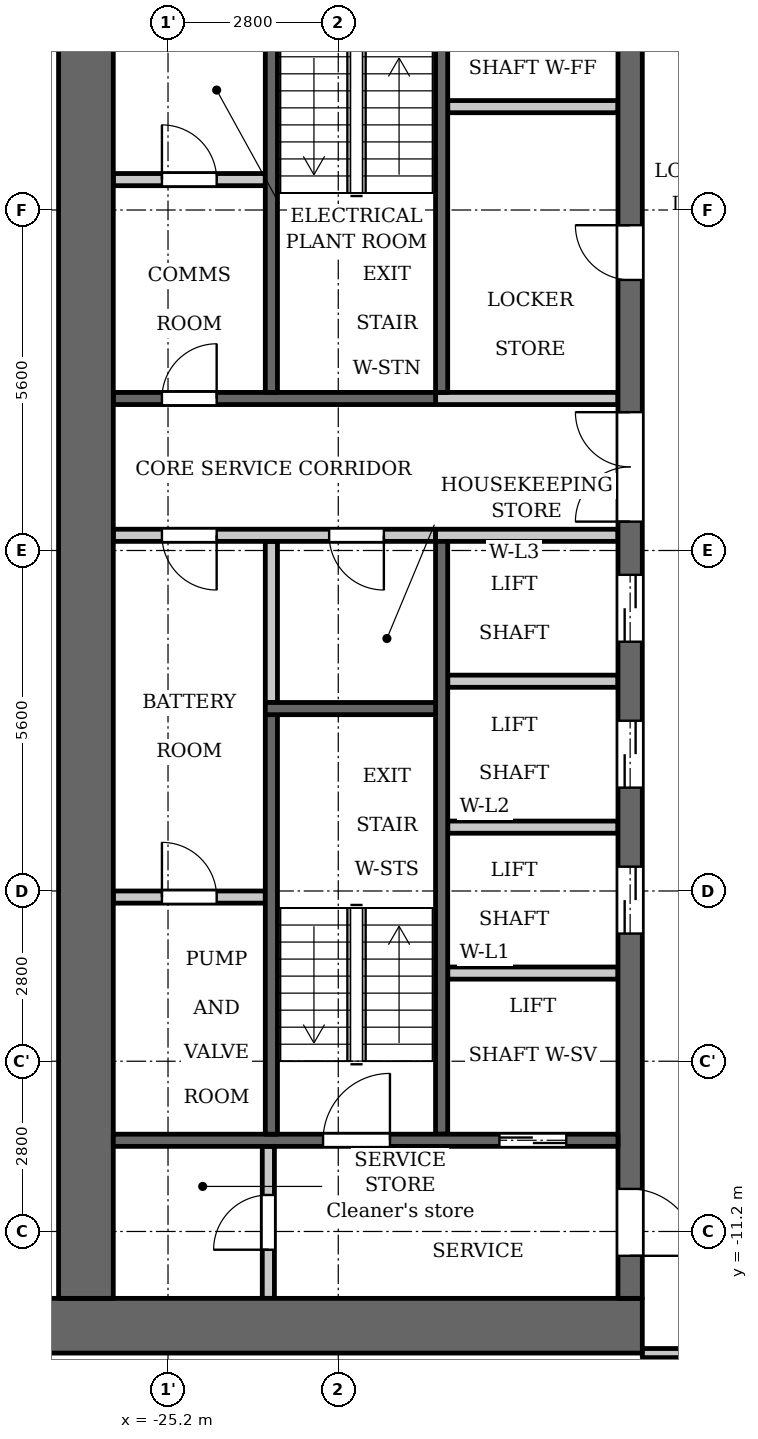
"""IFC4 building model, lengths in metres.
Left out: names, types, materials, properties, quantities, classifications, styles, units other than length and angle.
Written with IfcOpenShell. Run it as: python <this file> out.ifc"""

import sys

from ifc_helpers import new_model, si_unit, direction, frame, frame_2d, origin, place, context, subcontext, project, spatial, rectangle, extrude, element, fill, save


model = new_model("IFC4")
c1 = context("Model", 3, precision=1e-05, world=origin(), true_north=direction((0.0, 1.0)))
c2 = subcontext(c1, "Body", "Model", "MODEL_VIEW")
j1 = project(units=[si_unit("LENGTHUNIT", "METRE"), si_unit("PLANEANGLEUNIT", "RADIAN")], contexts=[c1])
p1 = place(None, origin())
s1 = spatial("IfcSite", under=j1, at=p1, CompositionType="ELEMENT")
p2 = place(p1, origin())
s2 = spatial("IfcBuilding", under=s1, at=p2, CompositionType="ELEMENT")
p3 = place(p2, frame((0.0, 0.0, 51.5)))
s3 = spatial("IfcBuildingStorey", under=s2, at=p3, CompositionType="ELEMENT", Elevation=51.5)
p4 = place(p3, frame((-23.5, -2.5, 0.0), z_axis=(0.0, 0.0, 1.0), x_axis=(0.0, 1.0, 0.0)))
e1 = element("IfcWall", 1, at=p4, inside=s3, PredefinedType="PARTITIONING", context=c2, shape_type="SweptSolid", body=[
    extrude(rectangle(XDim=2.65, YDim=0.2, at=frame_2d((1.325, 0.0))), origin(), (0.0, 0.0, 1.0), 3.2),
])
p5 = place(p3, frame((-20.7, 2.6, 0.0), z_axis=(0.0, 0.0, 1.0), x_axis=(0.0, 1.0, 0.0)))
e2 = element("IfcWall", 2, at=p5, inside=s3, PredefinedType="SHEAR", context=c2, shape_type="SweptSolid", body=[
    extrude(rectangle(XDim=7.0, YDim=0.2, at=frame_2d((3.5, 0.0))), origin(), (0.0, 0.0, 1.0), 3.2),
])
p6 = place(p3, frame((-20.7, -9.6, 0.0), z_axis=(0.0, 0.0, 1.0), x_axis=(0.0, 1.0, 0.0)))
e3 = element("IfcWall", 3, at=p6, inside=s3, PredefinedType="SHEAR", context=c2, shape_type="SweptSolid", body=[
    extrude(rectangle(XDim=9.75, YDim=0.2, at=frame_2d((4.875, 0.0))), origin(), (0.0, 0.0, 1.0), 3.2),
])
p7 = place(p3, frame((-20.8, 2.5, 0.0), z_axis=(0.0, 0.0, 1.0), x_axis=(-1.0, 0.0, 0.0)))
e4 = element("IfcWall", 4, at=p7, inside=s3, PredefinedType="SHEAR", context=c2, shape_type="SweptSolid", body=[
    extrude(rectangle(XDim=5.3, YDim=0.2, at=frame_2d((2.65, 0.0))), origin(), (0.0, 0.0, 1.0), 3.2),
])
p8 = place(p7, frame((3.6, 0.0, 0.0)))
e5 = element("IfcOpeningElement", 5, at=p8, cuts=e4, PredefinedType="OPENING", context=c2, shape_type="SweptSolid", body=[
    extrude(rectangle(XDim=0.9, YDim=2.1, at=frame_2d((0.45, 1.05))), frame((0.0, 0.11, 0.0), z_axis=(0.0, -1.0, 0.0), x_axis=(1.0, 0.0, 0.0)), (0.0, 0.0, 1.0), 0.22),
])
p9 = place(p3, frame((-20.8, 0.25, 0.0), z_axis=(0.0, 0.0, 1.0), x_axis=(-1.0, 0.0, 0.0)))
e6 = element("IfcWall", 6, at=p9, inside=s3, PredefinedType="PARTITIONING", context=c2, shape_type="SweptSolid", body=[
    extrude(rectangle(XDim=5.3, YDim=0.2, at=frame_2d((2.65, 0.0))), origin(), (0.0, 0.0, 1.0), 3.2),
])
p10 = place(p9, frame((0.85, 0.0, 0.0)))
e7 = element("IfcOpeningElement", 7, at=p10, cuts=e6, PredefinedType="OPENING", context=c2, shape_type="SweptSolid", body=[
    extrude(rectangle(XDim=0.9, YDim=2.1, at=frame_2d((0.45, 1.05))), frame((0.0, 0.11, 0.0), z_axis=(0.0, -1.0, 0.0), x_axis=(1.0, 0.0, 0.0)), (0.0, 0.0, 1.0), 0.22),
])
p11 = place(p9, frame((3.6, 0.0, 0.0)))
e8 = element("IfcOpeningElement", 8, at=p11, cuts=e6, PredefinedType="OPENING", context=c2, shape_type="SweptSolid", body=[
    extrude(rectangle(XDim=0.9, YDim=2.1, at=frame_2d((0.45, 1.05))), frame((0.0, 0.11, 0.0), z_axis=(0.0, -1.0, 0.0), x_axis=(1.0, 0.0, 0.0)), (0.0, 0.0, 1.0), 0.22),
])
p12 = place(p3, frame((-17.4, -12.75, 0.0), z_axis=(0.0, 0.0, 1.0), x_axis=(-1.0, 0.0, 0.0)))
e9 = element("IfcWall", 9, at=p12, inside=s3, PredefinedType="SHEAR", context=c2, shape_type="SweptSolid", body=[
    extrude(rectangle(XDim=10.4, YDim=0.9, at=frame_2d((5.2, 0.0))), origin(), (0.0, 0.0, 1.0), 3.2),
])
p13 = place(p3, frame((-17.6, -12.3, 0.0), z_axis=(0.0, 0.0, 1.0), x_axis=(0.0, 1.0, 0.0)))
e10 = element("IfcWall", 10, at=p13, inside=s3, PredefinedType="SHEAR", context=c2, shape_type="SweptSolid", body=[
    extrude(rectangle(XDim=24.6, YDim=0.4, at=frame_2d((12.3, 0.0))), origin(), (0.0, 0.0, 1.0), 3.2),
])
p14 = place(p13, frame((6.0, 0.0, 0.0)))
e11 = element("IfcOpeningElement", 11, at=p14, cuts=e10, PredefinedType="OPENING", context=c2, shape_type="SweptSolid", body=[
    extrude(rectangle(XDim=1.1, YDim=2.1, at=frame_2d((0.55, 1.05))), frame((0.0, 0.21, 0.0), z_axis=(0.0, -1.0, 0.0), x_axis=(1.0, 0.0, 0.0)), (0.0, 0.0, 1.0), 0.42),
])
p15 = place(p13, frame((8.4, 0.0, 0.0)))
e12 = element("IfcOpeningElement", 12, at=p15, cuts=e10, PredefinedType="OPENING", context=c2, shape_type="SweptSolid", body=[
    extrude(rectangle(XDim=1.1, YDim=2.1, at=frame_2d((0.55, 1.05))), frame((0.0, 0.21, 0.0), z_axis=(0.0, -1.0, 0.0), x_axis=(1.0, 0.0, 0.0)), (0.0, 0.0, 1.0), 0.42),
])
p16 = place(p13, frame((10.8, 0.0, 0.0)))
e13 = element("IfcOpeningElement", 13, at=p16, cuts=e10, PredefinedType="OPENING", context=c2, shape_type="SweptSolid", body=[
    extrude(rectangle(XDim=1.1, YDim=2.1, at=frame_2d((0.55, 1.05))), frame((0.0, 0.21, 0.0), z_axis=(0.0, -1.0, 0.0), x_axis=(1.0, 0.0, 0.0)), (0.0, 0.0, 1.0), 0.42),
])
p17 = place(p13, frame((16.75, 0.0, 0.0)))
e14 = element("IfcOpeningElement", 14, at=p17, cuts=e10, PredefinedType="OPENING", context=c2, shape_type="SweptSolid", body=[
    extrude(rectangle(XDim=0.9, YDim=2.1, at=frame_2d((0.45, 1.05))), frame((0.0, 0.21, 0.0), z_axis=(0.0, -1.0, 0.0), x_axis=(1.0, 0.0, 0.0)), (0.0, 0.0, 1.0), 0.42),
])
p18 = place(p13, frame((22.8, 0.0, 0.0)))
e15 = element("IfcOpeningElement", 15, at=p18, cuts=e10, PredefinedType="OPENING", context=c2, shape_type="SweptSolid", body=[
    extrude(rectangle(XDim=1.1, YDim=2.1, at=frame_2d((0.55, 1.05))), frame((0.0, 0.21, 0.0), z_axis=(0.0, -1.0, 0.0), x_axis=(1.0, 0.0, 0.0)), (0.0, 0.0, 1.0), 0.42),
])
p19 = place(p13, frame((0.7, 0.0, 0.0)))
e16 = element("IfcOpeningElement", 16, at=p19, cuts=e10, PredefinedType="OPENING", context=c2, shape_type="SweptSolid", body=[
    extrude(rectangle(XDim=1.1, YDim=2.1, at=frame_2d((0.55, 1.05))), frame((0.0, 0.21, 0.0), z_axis=(0.0, -1.0, 0.0), x_axis=(1.0, 0.0, 0.0)), (0.0, 0.0, 1.0), 0.42),
])
p20 = place(p13, frame((12.775, 0.0, 0.0)))
e17 = element("IfcOpeningElement", 17, at=p20, cuts=e10, PredefinedType="OPENING", context=c2, shape_type="SweptSolid", body=[
    extrude(rectangle(XDim=1.8, YDim=2.1, at=frame_2d((0.9, 1.05))), frame((0.0, 0.21, 0.0), z_axis=(0.0, -1.0, 0.0), x_axis=(1.0, 0.0, 0.0)), (0.0, 0.0, 1.0), 0.42),
])
p21 = place(p3, frame((-26.55, -12.3, 0.0), z_axis=(0.0, 0.0, 1.0), x_axis=(0.0, 1.0, 0.0)))
e18 = element("IfcWall", 18, at=p21, inside=s3, PredefinedType="SHEAR", context=c2, shape_type="SweptSolid", body=[
    extrude(rectangle(XDim=24.6, YDim=0.9, at=frame_2d((12.3, 0.0))), origin(), (0.0, 0.0, 1.0), 3.2),
])
p22 = place(p3, frame((-23.55, -12.3, 0.0), z_axis=(0.0, 0.0, 1.0), x_axis=(0.0, 1.0, 0.0)))
e19 = element("IfcWall", 19, at=p22, inside=s3, PredefinedType="PARTITIONING", context=c2, shape_type="SweptSolid", body=[
    extrude(rectangle(XDim=2.5, YDim=0.2, at=frame_2d((1.25, 0.0))), origin(), (0.0, 0.0, 1.0), 3.2),
])
p23 = place(p22, frame((0.8, 0.0, 0.0)))
e20 = element("IfcOpeningElement", 20, at=p23, cuts=e19, PredefinedType="OPENING", context=c2, shape_type="SweptSolid", body=[
    extrude(rectangle(XDim=0.9, YDim=2.1, at=frame_2d((0.45, 1.05))), frame((0.0, 0.11, 0.0), z_axis=(0.0, -1.0, 0.0), x_axis=(1.0, 0.0, 0.0)), (0.0, 0.0, 1.0), 0.22),
])
p24 = place(p3, frame((-23.6, -5.7, 0.0), z_axis=(0.0, 0.0, 1.0), x_axis=(-1.0, 0.0, 0.0)))
e21 = element("IfcWall", 21, at=p24, inside=s3, PredefinedType="PARTITIONING", context=c2, shape_type="SweptSolid", body=[
    extrude(rectangle(XDim=2.5, YDim=0.2, at=frame_2d((1.25, 0.0))), origin(), (0.0, 0.0, 1.0), 3.2),
])
p25 = place(p24, frame((0.8, 0.0, 0.0)))
e22 = element("IfcOpeningElement", 22, at=p25, cuts=e21, PredefinedType="OPENING", context=c2, shape_type="SweptSolid", body=[
    extrude(rectangle(XDim=0.9, YDim=2.1, at=frame_2d((0.45, 1.05))), frame((0.0, 0.11, 0.0), z_axis=(0.0, -1.0, 0.0), x_axis=(1.0, 0.0, 0.0)), (0.0, 0.0, 1.0), 0.22),
])
p26 = place(p3, frame((-23.6, 6.1, 0.0), z_axis=(0.0, 0.0, 1.0), x_axis=(-1.0, 0.0, 0.0)))
e23 = element("IfcWall", 23, at=p26, inside=s3, PredefinedType="PARTITIONING", context=c2, shape_type="SweptSolid", body=[
    extrude(rectangle(XDim=2.5, YDim=0.2, at=frame_2d((1.25, 0.0))), origin(), (0.0, 0.0, 1.0), 3.2),
])
p27 = place(p26, frame((0.8, 0.0, 0.0)))
e24 = element("IfcOpeningElement", 24, at=p27, cuts=e23, PredefinedType="OPENING", context=c2, shape_type="SweptSolid", body=[
    extrude(rectangle(XDim=0.9, YDim=2.1, at=frame_2d((0.45, 1.05))), frame((0.0, 0.11, 0.0), z_axis=(0.0, -1.0, 0.0), x_axis=(1.0, 0.0, 0.0)), (0.0, 0.0, 1.0), 0.22),
])
p28 = place(p3, frame((-17.8, -9.7, 0.0), z_axis=(0.0, 0.0, 1.0), x_axis=(-1.0, 0.0, 0.0)))
e25 = element("IfcWall", 25, at=p28, inside=s3, PredefinedType="SHEAR", context=c2, shape_type="SweptSolid", body=[
    extrude(rectangle(XDim=8.3, YDim=0.2, at=frame_2d((4.15, 0.0))), origin(), (0.0, 0.0, 1.0), 3.2),
])
p29 = place(p28, frame((0.85, 0.0, 0.0)))
e26 = element("IfcOpeningElement", 26, at=p29, cuts=e25, PredefinedType="OPENING", context=c2, shape_type="SweptSolid", body=[
    extrude(rectangle(XDim=1.1, YDim=2.1, at=frame_2d((0.55, 1.05))), frame((0.0, 0.11, 0.0), z_axis=(0.0, -1.0, 0.0), x_axis=(1.0, 0.0, 0.0)), (0.0, 0.0, 1.0), 0.22),
])
p30 = place(p28, frame((3.75, 0.0, 0.0)))
e27 = element("IfcOpeningElement", 27, at=p30, cuts=e25, PredefinedType="OPENING", context=c2, shape_type="SweptSolid", body=[
    extrude(rectangle(XDim=1.1, YDim=2.1, at=frame_2d((0.55, 1.05))), frame((0.0, 0.11, 0.0), z_axis=(0.0, -1.0, 0.0), x_axis=(1.0, 0.0, 0.0)), (0.0, 0.0, 1.0), 0.22),
])
for number, where, z_axis, x_axis in (
    (28, (-17.8, -6.95, 0.0), (0.0, 0.0, 1.0), (-1.0, 0.0, 0.0)),
    (29, (-17.8, -4.55, 0.0), (0.0, 0.0, 1.0), (-1.0, 0.0, 0.0)),
    (30, (-17.8, -2.15, 0.0), (0.0, 0.0, 1.0), (-1.0, 0.0, 0.0)),
):
    element("IfcWall", number, at=place(p3, frame(where, z_axis=z_axis, x_axis=x_axis)), inside=s3, PredefinedType="PARTITIONING", context=c2, shape_type="SweptSolid", body=[
        extrude(rectangle(XDim=2.8, YDim=0.2, at=frame_2d((1.4, 0.0))), origin(), (0.0, 0.0, 1.0), 3.2),
    ])
for number, where, z_axis, x_axis in (
    (31, (-17.8, 0.25, 0.0), (0.0, 0.0, 1.0), (-1.0, 0.0, 0.0)),
    (32, (-17.8, 2.5, 0.0), (0.0, 0.0, 1.0), (-1.0, 0.0, 0.0)),
):
    element("IfcWall", number, at=place(p3, frame(where, z_axis=z_axis, x_axis=x_axis)), inside=s3, PredefinedType="PARTITIONING", context=c2, shape_type="SweptSolid", body=[
        extrude(rectangle(XDim=3.0, YDim=0.2, at=frame_2d((1.5, 0.0))), origin(), (0.0, 0.0, 1.0), 3.2),
    ])
p31 = place(p3, frame((-17.8, 7.3, 0.0), z_axis=(0.0, 0.0, 1.0), x_axis=(-1.0, 0.0, 0.0)))
e33 = element("IfcWall", 33, at=p31, inside=s3, PredefinedType="PARTITIONING", context=c2, shape_type="SweptSolid", body=[
    extrude(rectangle(XDim=2.8, YDim=0.2, at=frame_2d((1.4, 0.0))), origin(), (0.0, 0.0, 1.0), 3.2),
])
p32 = place(p3, frame((-23.5, 2.6, 0.0), z_axis=(0.0, 0.0, 1.0), x_axis=(0.0, 1.0, 0.0)))
e34 = element("IfcWall", 34, at=p32, inside=s3, PredefinedType="SHEAR", context=c2, shape_type="SweptSolid", body=[
    extrude(rectangle(XDim=7.0, YDim=0.2, at=frame_2d((3.5, 0.0))), origin(), (0.0, 0.0, 1.0), 3.2),
])
p33 = place(p3, frame((-23.5, -9.6, 0.0), z_axis=(0.0, 0.0, 1.0), x_axis=(0.0, 1.0, 0.0)))
e35 = element("IfcWall", 35, at=p33, inside=s3, PredefinedType="SHEAR", context=c2, shape_type="SweptSolid", body=[
    extrude(rectangle(XDim=6.9, YDim=0.2, at=frame_2d((3.45, 0.0))), origin(), (0.0, 0.0, 1.0), 3.2),
])
p34 = place(p3, frame((-20.8, -2.6, 0.0), z_axis=(0.0, 0.0, 1.0), x_axis=(-1.0, 0.0, 0.0)))
e36 = element("IfcWall", 36, at=p34, inside=s3, PredefinedType="SHEAR", context=c2, shape_type="SweptSolid", body=[
    extrude(rectangle(XDim=2.8, YDim=0.2, at=frame_2d((1.4, 0.0))), origin(), (0.0, 0.0, 1.0), 3.2),
])
p35 = place(p3, frame((-17.4, -13.2, 0.0), z_axis=(0.0, 0.0, 1.0), x_axis=(1.0, 0.0, 0.0)))
e37 = element("IfcWall", 37, at=p35, inside=s3, PredefinedType="PARTITIONING", context=c2, shape_type="SweptSolid", body=[
    extrude(rectangle(XDim=34.8, YDim=0.15, at=frame_2d((17.4, 0.0))), origin(), (0.0, 0.0, 1.0), 3.2),
])
p36 = place(p35, frame((0.65, 0.0, 0.0)))
e38 = element("IfcOpeningElement", 38, at=p36, cuts=e37, PredefinedType="OPENING", context=c2, shape_type="SweptSolid", body=[
    extrude(rectangle(XDim=1.0, YDim=2.1, at=frame_2d((0.5, 1.05))), frame((0.0, 0.085, 0.0), z_axis=(0.0, -1.0, 0.0), x_axis=(1.0, 0.0, 0.0)), (0.0, 0.0, 1.0), 0.17),
])
p37 = place(p35, frame((33.05, 0.0, 0.0)))
e39 = element("IfcOpeningElement", 39, at=p37, cuts=e37, PredefinedType="OPENING", context=c2, shape_type="SweptSolid", body=[
    extrude(rectangle(XDim=1.0, YDim=2.1, at=frame_2d((0.5, 1.05))), frame((0.0, 0.085, 0.0), z_axis=(0.0, -1.0, 0.0), x_axis=(1.0, 0.0, 0.0)), (0.0, 0.0, 1.0), 0.17),
])
p38 = place(p35, frame((10.15, 0.0, 0.0)))
e40 = element("IfcOpeningElement", 40, at=p38, cuts=e37, PredefinedType="OPENING", context=c2, shape_type="SweptSolid", body=[
    extrude(rectangle(XDim=1.0, YDim=2.1, at=frame_2d((0.5, 1.05))), frame((0.0, 0.085, 0.0), z_axis=(0.0, -1.0, 0.0), x_axis=(1.0, 0.0, 0.0)), (0.0, 0.0, 1.0), 0.17),
])
p39 = place(p35, frame((21.35, 0.0, 0.0)))
e41 = element("IfcOpeningElement", 41, at=p39, cuts=e37, PredefinedType="OPENING", context=c2, shape_type="SweptSolid", body=[
    extrude(rectangle(XDim=1.0, YDim=2.1, at=frame_2d((0.5, 1.05))), frame((0.0, 0.085, 0.0), z_axis=(0.0, -1.0, 0.0), x_axis=(1.0, 0.0, 0.0)), (0.0, 0.0, 1.0), 0.17),
])
p40 = place(p35, frame((30.75, 0.0, 0.0)))
e42 = element("IfcOpeningElement", 42, at=p40, cuts=e37, PredefinedType="OPENING", context=c2, shape_type="SweptSolid", body=[
    extrude(rectangle(XDim=1.0, YDim=2.1, at=frame_2d((0.5, 1.05))), frame((0.0, 0.085, 0.0), z_axis=(0.0, -1.0, 0.0), x_axis=(1.0, 0.0, 0.0)), (0.0, 0.0, 1.0), 0.17),
])
p41 = place(p29, origin())
e43 = element("IfcDoor", 43, at=p41, inside=s3, OperationType="DOUBLE_DOOR_SLIDING", PredefinedType="DOOR", context=c2, shape_type="SweptSolid", body=[
    extrude(rectangle(XDim=1.1, YDim=2.1, at=frame_2d((0.55, 1.05))), frame((0.0, 0.025, 0.0), z_axis=(0.0, -1.0, 0.0), x_axis=(1.0, 0.0, 0.0)), (0.0, 0.0, 1.0), 0.05),
])
fill(e26, e43)
p42 = place(p14, origin())
e44 = element("IfcDoor", 44, at=p42, inside=s3, OperationType="DOUBLE_DOOR_SLIDING", PredefinedType="DOOR", context=c2, shape_type="SweptSolid", body=[
    extrude(rectangle(XDim=1.1, YDim=2.1, at=frame_2d((0.55, 1.05))), frame((0.0, 0.025, 0.0), z_axis=(0.0, -1.0, 0.0), x_axis=(1.0, 0.0, 0.0)), (0.0, 0.0, 1.0), 0.05),
])
fill(e11, e44)
p43 = place(p15, origin())
e45 = element("IfcDoor", 45, at=p43, inside=s3, OperationType="DOUBLE_DOOR_SLIDING", PredefinedType="DOOR", context=c2, shape_type="SweptSolid", body=[
    extrude(rectangle(XDim=1.1, YDim=2.1, at=frame_2d((0.55, 1.05))), frame((0.0, 0.025, 0.0), z_axis=(0.0, -1.0, 0.0), x_axis=(1.0, 0.0, 0.0)), (0.0, 0.0, 1.0), 0.05),
])
fill(e12, e45)
p44 = place(p16, origin())
e46 = element("IfcDoor", 46, at=p44, inside=s3, OperationType="DOUBLE_DOOR_SLIDING", PredefinedType="DOOR", context=c2, shape_type="SweptSolid", body=[
    extrude(rectangle(XDim=1.1, YDim=2.1, at=frame_2d((0.55, 1.05))), frame((0.0, 0.025, 0.0), z_axis=(0.0, -1.0, 0.0), x_axis=(1.0, 0.0, 0.0)), (0.0, 0.0, 1.0), 0.05),
])
fill(e13, e46)
p45 = place(p17, origin())
e47 = element("IfcDoor", 47, at=p45, inside=s3, OperationType="SINGLE_SWING_LEFT", PredefinedType="DOOR", context=c2, shape_type="SweptSolid", body=[
    extrude(rectangle(XDim=0.9, YDim=2.1, at=frame_2d((0.45, 1.05))), frame((0.0, 0.025, 0.0), z_axis=(0.0, -1.0, 0.0), x_axis=(1.0, 0.0, 0.0)), (0.0, 0.0, 1.0), 0.05),
])
fill(e14, e47)
p46 = place(p19, origin())
e48 = element("IfcDoor", 48, at=p46, inside=s3, OperationType="SINGLE_SWING_LEFT", PredefinedType="DOOR", context=c2, shape_type="SweptSolid", body=[
    extrude(rectangle(XDim=1.1, YDim=2.1, at=frame_2d((0.55, 1.05))), frame((0.0, 0.025, 0.0), z_axis=(0.0, -1.0, 0.0), x_axis=(1.0, 0.0, 0.0)), (0.0, 0.0, 1.0), 0.05),
])
fill(e16, e48)
p47 = place(p23, origin())
e49 = element("IfcDoor", 49, at=p47, inside=s3, OperationType="SINGLE_SWING_RIGHT", PredefinedType="DOOR", context=c2, shape_type="SweptSolid", body=[
    extrude(rectangle(XDim=0.9, YDim=2.1, at=frame_2d((0.45, 1.05))), frame((0.0, 0.025, 0.0), z_axis=(0.0, -1.0, 0.0), x_axis=(1.0, 0.0, 0.0)), (0.0, 0.0, 1.0), 0.05),
])
fill(e20, e49)
p48 = place(p30, origin())
e50 = element("IfcDoor", 50, at=p48, inside=s3, OperationType="SINGLE_SWING_LEFT", PredefinedType="DOOR", context=c2, shape_type="SweptSolid", body=[
    extrude(rectangle(XDim=1.1, YDim=2.1, at=frame_2d((0.55, 1.05))), frame((0.0, 0.025, 0.0), z_axis=(0.0, -1.0, 0.0), x_axis=(1.0, 0.0, 0.0)), (0.0, 0.0, 1.0), 0.05),
])
fill(e27, e50)
p49 = place(p20, origin())
e51 = element("IfcDoor", 51, at=p49, inside=s3, OperationType="DOUBLE_DOOR_SINGLE_SWING", PredefinedType="DOOR", context=c2, shape_type="SweptSolid", body=[
    extrude(rectangle(XDim=1.8, YDim=2.1, at=frame_2d((0.9, 1.05))), frame((0.0, 0.025, 0.0), z_axis=(0.0, -1.0, 0.0), x_axis=(1.0, 0.0, 0.0)), (0.0, 0.0, 1.0), 0.05),
])
fill(e17, e51)
p50 = place(p10, origin())
e52 = element("IfcDoor", 52, at=p50, inside=s3, OperationType="SINGLE_SWING_RIGHT", PredefinedType="DOOR", context=c2, shape_type="SweptSolid", body=[
    extrude(rectangle(XDim=0.9, YDim=2.1, at=frame_2d((0.45, 1.05))), frame((0.0, 0.025, 0.0), z_axis=(0.0, -1.0, 0.0), x_axis=(1.0, 0.0, 0.0)), (0.0, 0.0, 1.0), 0.05),
])
fill(e7, e52)
p51 = place(p25, origin())
e53 = element("IfcDoor", 53, at=p51, inside=s3, OperationType="SINGLE_SWING_RIGHT", PredefinedType="DOOR", context=c2, shape_type="SweptSolid", body=[
    extrude(rectangle(XDim=0.9, YDim=2.1, at=frame_2d((0.45, 1.05))), frame((0.0, 0.025, 0.0), z_axis=(0.0, -1.0, 0.0), x_axis=(1.0, 0.0, 0.0)), (0.0, 0.0, 1.0), 0.05),
])
fill(e22, e53)
p52 = place(p11, origin())
e54 = element("IfcDoor", 54, at=p52, inside=s3, OperationType="SINGLE_SWING_RIGHT", PredefinedType="DOOR", context=c2, shape_type="SweptSolid", body=[
    extrude(rectangle(XDim=0.9, YDim=2.1, at=frame_2d((0.45, 1.05))), frame((0.0, 0.025, 0.0), z_axis=(0.0, -1.0, 0.0), x_axis=(1.0, 0.0, 0.0)), (0.0, 0.0, 1.0), 0.05),
])
fill(e8, e54)
p53 = place(p27, origin())
e55 = element("IfcDoor", 55, at=p53, inside=s3, OperationType="SINGLE_SWING_RIGHT", PredefinedType="DOOR", context=c2, shape_type="SweptSolid", body=[
    extrude(rectangle(XDim=0.9, YDim=2.1, at=frame_2d((0.45, 1.05))), frame((0.0, 0.025, 0.0), z_axis=(0.0, -1.0, 0.0), x_axis=(1.0, 0.0, 0.0)), (0.0, 0.0, 1.0), 0.05),
])
fill(e24, e55)
p54 = place(p8, origin())
e56 = element("IfcDoor", 56, at=p54, inside=s3, OperationType="SINGLE_SWING_LEFT", PredefinedType="DOOR", context=c2, shape_type="SweptSolid", body=[
    extrude(rectangle(XDim=0.9, YDim=2.1, at=frame_2d((0.45, 1.05))), frame((0.0, 0.025, 0.0), z_axis=(0.0, -1.0, 0.0), x_axis=(1.0, 0.0, 0.0)), (0.0, 0.0, 1.0), 0.05),
])
fill(e5, e56)
save(model, sys.argv[1])
